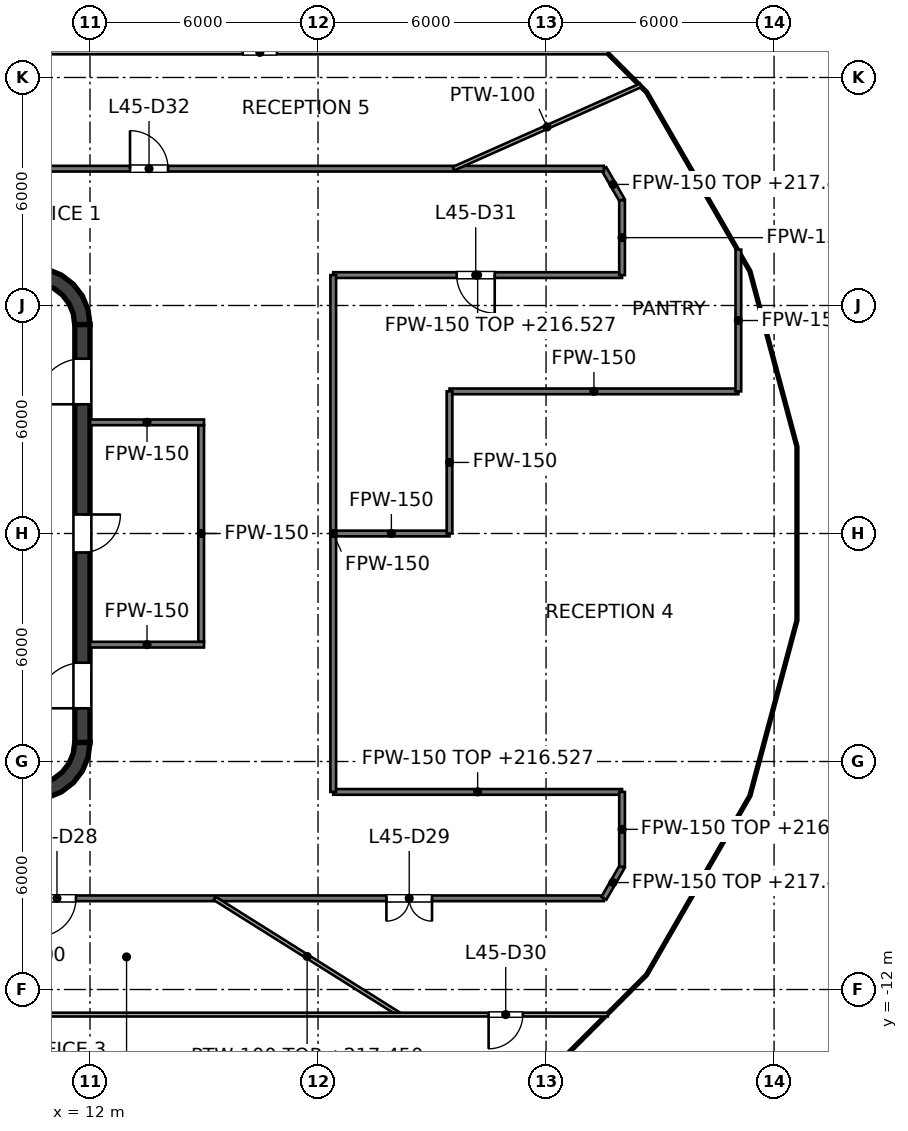
"""IFC4 building model, lengths in metres.
Left out: names, types, materials, properties, quantities, classifications, styles, units other than length and angle.
Written with IfcOpenShell. Run it as: python <this file> out.ifc"""

import sys

from ifc_helpers import new_model, si_unit, direction, frame, frame_2d, origin, place, context, subcontext, project, spatial, polyline, rectangle, outline, extrude, element, fill, save


model = new_model("IFC4")
c1 = context("Model", 3, precision=1e-05, world=origin(), true_north=direction((0.0, 1.0)))
c2 = subcontext(c1, "Body", "Model", "MODEL_VIEW")
j1 = project(units=[si_unit("LENGTHUNIT", "METRE"), si_unit("PLANEANGLEUNIT", "RADIAN")], contexts=[c1])
p1 = place(None, origin())
s1 = spatial("IfcSite", under=j1, at=p1, CompositionType="ELEMENT")
p2 = place(p1, origin())
s2 = spatial("IfcBuilding", under=s1, at=p2, CompositionType="ELEMENT")
p3 = place(p2, frame((0.0, 0.0, 213.6)))
s3 = spatial("IfcBuildingStorey", under=s2, at=p3, CompositionType="ELEMENT", Elevation=213.6)
p4 = place(p3, frame((11.8, -5.5, 0.0), z_axis=(0.0, 0.0, 1.0), x_axis=(0.0, 1.0, 0.0)))
e1 = element("IfcWall", 1, at=p4, inside=s3, PredefinedType="SHEAR", context=c2, shape_type="SweptSolid", body=[
    extrude(rectangle(XDim=11.0, YDim=0.4, at=frame_2d((5.5, 0.0))), origin(), (0.0, 0.0, 1.0), 4.0),
])
p5 = place(p4, frame((5.0, 0.0, 0.0)))
e2 = element("IfcOpeningElement", 2, at=p5, cuts=e1, PredefinedType="OPENING", context=c2, shape_type="SweptSolid", body=[
    extrude(rectangle(XDim=1.0, YDim=2.1, at=frame_2d((0.5, 1.05))), frame((0.0, 0.2, 0.0), z_axis=(0.0, -1.0, 0.0), x_axis=(1.0, 0.0, 0.0)), (0.0, 0.0, 1.0), 0.4),
])
p6 = place(p4, frame((0.9, 0.0, 0.0)))
e3 = element("IfcOpeningElement", 3, at=p6, cuts=e1, PredefinedType="OPENING", context=c2, shape_type="SweptSolid", body=[
    extrude(rectangle(XDim=1.2, YDim=2.1, at=frame_2d((0.6, 1.05))), frame((0.0, 0.2, 0.0), z_axis=(0.0, -1.0, 0.0), x_axis=(1.0, 0.0, 0.0)), (0.0, 0.0, 1.0), 0.4),
])
p7 = place(p4, frame((8.9, 0.0, 0.0)))
e4 = element("IfcOpeningElement", 4, at=p7, cuts=e1, PredefinedType="OPENING", context=c2, shape_type="SweptSolid", body=[
    extrude(rectangle(XDim=1.2, YDim=2.1, at=frame_2d((0.6, 1.05))), frame((0.0, 0.2, 0.0), z_axis=(0.0, -1.0, 0.0), x_axis=(1.0, 0.0, 0.0)), (0.0, 0.0, 1.0), 0.4),
])
p8 = place(p3, origin())
e5 = element("IfcWall", 5, at=p8, inside=s3, PredefinedType="SHEAR", context=c2, shape_type="SweptSolid", body=[
    extrude(outline(polyline([(10.5, 7.0), (10.5, 6.596), (10.784, 6.559), (11.048, 6.45), (11.275, 6.275), (11.45, 6.048), (11.559, 5.784), (11.596, 5.5), (12.0, 5.5), (11.949, 5.888), (11.799, 6.25), (11.561, 6.561), (11.25, 6.799), (10.888, 6.949), (10.5, 7.0)])), origin(), (0.0, 0.0, 1.0), 4.0),
])
e6 = element("IfcWall", 6, at=p8, inside=s3, PredefinedType="SHEAR", context=c2, shape_type="SweptSolid", body=[
    extrude(outline(polyline([(12.0, -5.5), (11.596, -5.5), (11.559, -5.784), (11.45, -6.048), (11.275, -6.275), (11.048, -6.45), (10.784, -6.559), (10.5, -6.596), (10.5, -7.0), (10.888, -6.949), (11.25, -6.799), (11.561, -6.561), (11.799, -6.25), (11.949, -5.888), (12.0, -5.5)])), origin(), (0.0, 0.0, 1.0), 4.0),
])
p9 = place(p3, frame((14.925, -2.85, 0.0), z_axis=(0.0, 0.0, 1.0), x_axis=(0.0, 1.0, 0.0)))
e7 = element("IfcWall", 7, at=p9, inside=s3, PredefinedType="PARTITIONING", context=c2, shape_type="SweptSolid", body=[
    extrude(rectangle(XDim=5.7, YDim=0.15, at=frame_2d((2.85, 0.0))), origin(), (0.0, 0.0, 1.0), 2.918),
])
for number, where, z_axis, x_axis in (
    (8, (12.0, 2.925, 0.0), (0.0, 0.0, 1.0), (1.0, 0.0, 0.0)),
    (9, (12.0, -2.925, 0.0), (0.0, 0.0, 1.0), (1.0, 0.0, 0.0)),
):
    element("IfcWall", number, at=place(p3, frame(where, z_axis=z_axis, x_axis=x_axis)), inside=s3, PredefinedType="PARTITIONING", context=c2, shape_type="SweptSolid", body=[
        extrude(rectangle(XDim=3.0, YDim=0.15, at=frame_2d((1.5, 0.0))), origin(), (0.0, 0.0, 1.0), 2.918),
    ])
p10 = place(p3, frame((25.522, 9.6, 0.0), z_axis=(0.0, 0.0, 1.0), x_axis=(0.499980071345, -0.866036909293, 0.0)))
e10 = element("IfcWall", 10, at=p10, inside=s3, PredefinedType="PARTITIONING", context=c2, shape_type="SweptSolid", body=[
    extrude(rectangle(XDim=0.957, YDim=0.15, at=frame_2d((0.479, 0.0))), origin(), (0.0, 0.0, 1.0), 3.85),
])
p11 = place(p3, frame((-25.521, -9.6, 0.0), z_axis=(0.0, 0.0, 1.0), x_axis=(1.0, 0.0, 0.0)))
e11 = element("IfcWall", 11, at=p11, inside=s3, PredefinedType="PARTITIONING", context=c2, shape_type="SweptSolid", body=[
    extrude(rectangle(XDim=51.042, YDim=0.15, at=frame_2d((25.521, 0.0))), origin(), (0.0, 0.0, 1.0), 2.927),
])
p12 = place(p11, frame((5.073, 0.0, 0.0)))
e12 = element("IfcOpeningElement", 12, at=p12, cuts=e11, PredefinedType="OPENING", context=c2, shape_type="SweptSolid", body=[
    extrude(rectangle(XDim=1.0, YDim=2.1, at=frame_2d((0.5, 1.05))), frame((0.0, 0.075, 0.0), z_axis=(0.0, -1.0, 0.0), x_axis=(1.0, 0.0, 0.0)), (0.0, 0.0, 1.0), 0.15),
])
p13 = place(p11, frame((13.936, 0.0, 0.0)))
e13 = element("IfcOpeningElement", 13, at=p13, cuts=e11, PredefinedType="OPENING", context=c2, shape_type="SweptSolid", body=[
    extrude(rectangle(XDim=1.0, YDim=2.1, at=frame_2d((0.5, 1.05))), frame((0.0, 0.075, 0.0), z_axis=(0.0, -1.0, 0.0), x_axis=(1.0, 0.0, 0.0)), (0.0, 0.0, 1.0), 0.15),
])
p14 = place(p11, frame((23.485, 0.0, 0.0)))
e14 = element("IfcOpeningElement", 14, at=p14, cuts=e11, PredefinedType="OPENING", context=c2, shape_type="SweptSolid", body=[
    extrude(rectangle(XDim=1.0, YDim=2.1, at=frame_2d((0.5, 1.05))), frame((0.0, 0.075, 0.0), z_axis=(0.0, -1.0, 0.0), x_axis=(1.0, 0.0, 0.0)), (0.0, 0.0, 1.0), 0.15),
])
p15 = place(p11, frame((29.799, 0.0, 0.0)))
e15 = element("IfcOpeningElement", 15, at=p15, cuts=e11, PredefinedType="OPENING", context=c2, shape_type="SweptSolid", body=[
    extrude(rectangle(XDim=1.0, YDim=2.1, at=frame_2d((0.5, 1.05))), frame((0.0, 0.075, 0.0), z_axis=(0.0, -1.0, 0.0), x_axis=(1.0, 0.0, 0.0)), (0.0, 0.0, 1.0), 0.15),
])
p16 = place(p11, frame((36.152, 0.0, 0.0)))
e16 = element("IfcOpeningElement", 16, at=p16, cuts=e11, PredefinedType="OPENING", context=c2, shape_type="SweptSolid", body=[
    extrude(rectangle(XDim=1.0, YDim=2.1, at=frame_2d((0.5, 1.05))), frame((0.0, 0.075, 0.0), z_axis=(0.0, -1.0, 0.0), x_axis=(1.0, 0.0, 0.0)), (0.0, 0.0, 1.0), 0.15),
])
p17 = place(p11, frame((45.321, 0.0, 0.0)))
e17 = element("IfcOpeningElement", 17, at=p17, cuts=e11, PredefinedType="OPENING", context=c2, shape_type="SweptSolid", body=[
    extrude(rectangle(XDim=1.2, YDim=2.1, at=frame_2d((0.6, 1.05))), frame((0.0, 0.075, 0.0), z_axis=(0.0, -1.0, 0.0), x_axis=(1.0, 0.0, 0.0)), (0.0, 0.0, 1.0), 0.15),
])
p18 = place(p3, frame((18.4, -6.8, 0.0), z_axis=(0.0, 0.0, 1.0), x_axis=(1.0, 0.0, 0.0)))
e18 = element("IfcWall", 18, at=p18, inside=s3, PredefinedType="PARTITIONING", context=c2, shape_type="SweptSolid", body=[
    extrude(rectangle(XDim=7.6, YDim=0.15, at=frame_2d((3.8, 0.0))), origin(), (0.0, 0.0, 1.0), 2.927),
])
p19 = place(p3, frame((18.4, 0.0, 0.0), z_axis=(0.0, 0.0, 1.0), x_axis=(1.0, 0.0, 0.0)))
e19 = element("IfcWall", 19, at=p19, inside=s3, PredefinedType="PARTITIONING", context=c2, shape_type="SweptSolid", body=[
    extrude(rectangle(XDim=3.06, YDim=0.15, at=frame_2d((1.53, 0.0))), origin(), (0.0, 0.0, 1.0), 2.918),
])
p20 = place(p3, frame((21.46, 3.74, 0.0), z_axis=(0.0, 0.0, 1.0), x_axis=(1.0, 0.0, 0.0)))
e20 = element("IfcWall", 20, at=p20, inside=s3, PredefinedType="PARTITIONING", context=c2, shape_type="SweptSolid", body=[
    extrude(rectangle(XDim=7.6, YDim=0.15, at=frame_2d((3.8, 0.0))), origin(), (0.0, 0.0, 1.0), 2.918),
])
p21 = place(p3, frame((18.4, 6.8, 0.0), z_axis=(0.0, 0.0, 1.0), x_axis=(1.0, 0.0, 0.0)))
e21 = element("IfcWall", 21, at=p21, inside=s3, PredefinedType="PARTITIONING", context=c2, shape_type="SweptSolid", body=[
    extrude(rectangle(XDim=7.6, YDim=0.15, at=frame_2d((3.8, 0.0))), origin(), (0.0, 0.0, 1.0), 2.927),
])
p22 = place(p21, frame((3.249, 0.0, 0.0)))
e22 = element("IfcOpeningElement", 22, at=p22, cuts=e21, PredefinedType="OPENING", context=c2, shape_type="SweptSolid", body=[
    extrude(rectangle(XDim=1.0, YDim=2.1, at=frame_2d((0.5, 1.05))), frame((0.0, 0.075, 0.0), z_axis=(0.0, -1.0, 0.0), x_axis=(1.0, 0.0, 0.0)), (0.0, 0.0, 1.0), 0.15),
])
p23 = place(p3, frame((-25.522, 9.6, 0.0), z_axis=(0.0, 0.0, 1.0), x_axis=(1.0, 0.0, 0.0)))
e23 = element("IfcWall", 23, at=p23, inside=s3, PredefinedType="PARTITIONING", context=c2, shape_type="SweptSolid", body=[
    extrude(rectangle(XDim=51.044, YDim=0.15, at=frame_2d((25.522, 0.0))), origin(), (0.0, 0.0, 1.0), 2.927),
])
p24 = place(p23, frame((28.517, 0.0, 0.0)))
e24 = element("IfcOpeningElement", 24, at=p24, cuts=e23, PredefinedType="OPENING", context=c2, shape_type="SweptSolid", body=[
    extrude(rectangle(XDim=1.0, YDim=2.1, at=frame_2d((0.5, 1.05))), frame((0.0, 0.075, 0.0), z_axis=(0.0, -1.0, 0.0), x_axis=(1.0, 0.0, 0.0)), (0.0, 0.0, 1.0), 0.15),
])
p25 = place(p23, frame((24.65, 0.0, 0.0)))
e25 = element("IfcOpeningElement", 25, at=p25, cuts=e23, PredefinedType="OPENING", context=c2, shape_type="SweptSolid", body=[
    extrude(rectangle(XDim=1.0, YDim=2.1, at=frame_2d((0.5, 1.05))), frame((0.0, 0.075, 0.0), z_axis=(0.0, -1.0, 0.0), x_axis=(1.0, 0.0, 0.0)), (0.0, 0.0, 1.0), 0.15),
])
p26 = place(p23, frame((19.126, 0.0, 0.0)))
e26 = element("IfcOpeningElement", 26, at=p26, cuts=e23, PredefinedType="OPENING", context=c2, shape_type="SweptSolid", body=[
    extrude(rectangle(XDim=1.0, YDim=2.1, at=frame_2d((0.5, 1.05))), frame((0.0, 0.075, 0.0), z_axis=(0.0, -1.0, 0.0), x_axis=(1.0, 0.0, 0.0)), (0.0, 0.0, 1.0), 0.15),
])
p27 = place(p23, frame((13.909, 0.0, 0.0)))
e27 = element("IfcOpeningElement", 27, at=p27, cuts=e23, PredefinedType="OPENING", context=c2, shape_type="SweptSolid", body=[
    extrude(rectangle(XDim=1.0, YDim=2.1, at=frame_2d((0.5, 1.05))), frame((0.0, 0.075, 0.0), z_axis=(0.0, -1.0, 0.0), x_axis=(1.0, 0.0, 0.0)), (0.0, 0.0, 1.0), 0.15),
])
p28 = place(p23, frame((5.848, 0.0, 0.0)))
e28 = element("IfcOpeningElement", 28, at=p28, cuts=e23, PredefinedType="OPENING", context=c2, shape_type="SweptSolid", body=[
    extrude(rectangle(XDim=1.2, YDim=2.1, at=frame_2d((0.6, 1.05))), frame((0.0, 0.075, 0.0), z_axis=(0.0, -1.0, 0.0), x_axis=(1.0, 0.0, 0.0)), (0.0, 0.0, 1.0), 0.15),
])
p29 = place(p23, frame((38.575, 0.0, 0.0)))
e29 = element("IfcOpeningElement", 29, at=p29, cuts=e23, PredefinedType="OPENING", context=c2, shape_type="SweptSolid", body=[
    extrude(rectangle(XDim=1.0, YDim=2.1, at=frame_2d((0.5, 1.05))), frame((0.0, 0.075, 0.0), z_axis=(0.0, -1.0, 0.0), x_axis=(1.0, 0.0, 0.0)), (0.0, 0.0, 1.0), 0.15),
])
p30 = place(p3, frame((25.521, -9.6, 0.0), z_axis=(0.0, 0.0, 1.0), x_axis=(0.499950501706, 0.866053979752, 0.0)))
e30 = element("IfcWall", 30, at=p30, inside=s3, PredefinedType="PARTITIONING", context=c2, shape_type="SweptSolid", body=[
    extrude(rectangle(XDim=0.958, YDim=0.15, at=frame_2d((0.479, 0.0))), origin(), (0.0, 0.0, 1.0), 3.85),
])
p31 = place(p3, frame((5.543, 9.6, 0.0), z_axis=(0.0, 0.0, 1.0), x_axis=(0.499967881601, 0.866043946556, 0.0)))
e31 = element("IfcWall", 31, at=p31, inside=s3, PredefinedType="PARTITIONING", context=c2, shape_type="SweptSolid", body=[
    extrude(rectangle(XDim=13.318, YDim=0.15, at=frame_2d((6.659, 0.0))), origin(), (0.0, 0.0, 1.0), 3.302),
])
p32 = place(p3, frame((29.06, 3.74, 0.0), z_axis=(0.0, 0.0, 1.0), x_axis=(0.0, 1.0, 0.0)))
e32 = element("IfcWall", 32, at=p32, inside=s3, PredefinedType="PARTITIONING", context=c2, shape_type="SweptSolid", body=[
    extrude(rectangle(XDim=3.73, YDim=0.15, at=frame_2d((1.865, 0.0))), origin(), (0.0, 0.0, 1.0), 2.918),
])
for number, where, z_axis, x_axis in (
    (33, (26.0, -8.771, 0.0), (0.0, 0.0, 1.0), (0.0, 1.0, 0.0)),
    (34, (26.0, 6.8, 0.0), (0.0, 0.0, 1.0), (0.0, 1.0, 0.0)),
):
    element("IfcWall", number, at=place(p3, frame(where, z_axis=z_axis, x_axis=x_axis)), inside=s3, PredefinedType="PARTITIONING", context=c2, shape_type="SweptSolid", body=[
        extrude(rectangle(XDim=1.971, YDim=0.15, at=frame_2d((0.985, 0.0))), origin(), (0.0, 0.0, 1.0), 2.927),
    ])
p33 = place(p3, frame((21.46, 0.0, 0.0), z_axis=(0.0, 0.0, 1.0), x_axis=(0.0, 1.0, 0.0)))
e35 = element("IfcWall", 35, at=p33, inside=s3, PredefinedType="PARTITIONING", context=c2, shape_type="SweptSolid", body=[
    extrude(rectangle(XDim=3.74, YDim=0.15, at=frame_2d((1.87, 0.0))), origin(), (0.0, 0.0, 1.0), 2.918),
])
p34 = place(p3, frame((18.4, -6.8, 0.0), z_axis=(0.0, 0.0, 1.0), x_axis=(0.0, 1.0, 0.0)))
e36 = element("IfcWall", 36, at=p34, inside=s3, PredefinedType="PARTITIONING", context=c2, shape_type="SweptSolid", body=[
    extrude(rectangle(XDim=13.6, YDim=0.15, at=frame_2d((6.8, 0.0))), origin(), (0.0, 0.0, 1.0), 2.918),
])
p35 = place(p3, frame((15.278, -9.6, 0.0), z_axis=(0.0, 0.0, 1.0), x_axis=(0.84673434941, -0.532015922252, 0.0)))
e37 = element("IfcWall", 37, at=p35, inside=s3, PredefinedType="PARTITIONING", context=c2, shape_type="SweptSolid", body=[
    extrude(rectangle(XDim=5.751, YDim=0.1, at=frame_2d((2.876, 0.0))), origin(), (0.0, 0.0, 1.0), 3.85),
])
p36 = place(p3, frame((-21.928, -12.66, 0.0), z_axis=(0.0, 0.0, 1.0), x_axis=(1.0, 0.0, 0.0)))
e38 = element("IfcWall", 38, at=p36, inside=s3, PredefinedType="PARTITIONING", context=c2, shape_type="SweptSolid", body=[
    extrude(rectangle(XDim=47.555, YDim=0.1, at=frame_2d((23.777, 0.0))), origin(), (0.0, 0.0, 1.0), 2.927),
])
p37 = place(p36, frame((19.02, 0.0, 0.0)))
e39 = element("IfcOpeningElement", 39, at=p37, cuts=e38, PredefinedType="OPENING", context=c2, shape_type="SweptSolid", body=[
    extrude(rectangle(XDim=1.8, YDim=2.1, at=frame_2d((0.9, 1.05))), frame((0.0, 0.05, 0.0), z_axis=(0.0, -1.0, 0.0), x_axis=(1.0, 0.0, 0.0)), (0.0, 0.0, 1.0), 0.1),
])
p38 = place(p36, frame((44.417, 0.0, 0.0)))
e40 = element("IfcOpeningElement", 40, at=p38, cuts=e38, PredefinedType="OPENING", context=c2, shape_type="SweptSolid", body=[
    extrude(rectangle(XDim=0.9, YDim=2.1, at=frame_2d((0.45, 1.05))), frame((0.0, 0.05, 0.0), z_axis=(0.0, -1.0, 0.0), x_axis=(1.0, 0.0, 0.0)), (0.0, 0.0, 1.0), 0.1),
])
p39 = place(p3, frame((-16.649, 12.66, 0.0), z_axis=(0.0, 0.0, 1.0), x_axis=(1.0, 0.0, 0.0)))
e41 = element("IfcWall", 41, at=p39, inside=s3, PredefinedType="PARTITIONING", context=c2, shape_type="SweptSolid", body=[
    extrude(rectangle(XDim=42.276, YDim=0.1, at=frame_2d((21.138, 0.0))), origin(), (0.0, 0.0, 1.0), 2.927),
])
p40 = place(p39, frame((8.025, 0.0, 0.0)))
e42 = element("IfcOpeningElement", 42, at=p40, cuts=e41, PredefinedType="OPENING", context=c2, shape_type="SweptSolid", body=[
    extrude(rectangle(XDim=1.8, YDim=2.1, at=frame_2d((0.9, 1.05))), frame((0.0, 0.05, 0.0), z_axis=(0.0, -1.0, 0.0), x_axis=(1.0, 0.0, 0.0)), (0.0, 0.0, 1.0), 0.1),
])
p41 = place(p39, frame((32.667, 0.0, 0.0)))
e43 = element("IfcOpeningElement", 43, at=p41, cuts=e41, PredefinedType="OPENING", context=c2, shape_type="SweptSolid", body=[
    extrude(rectangle(XDim=0.9, YDim=2.1, at=frame_2d((0.45, 1.05))), frame((0.0, 0.05, 0.0), z_axis=(0.0, -1.0, 0.0), x_axis=(1.0, 0.0, 0.0)), (0.0, 0.0, 1.0), 0.1),
])
p42 = place(p3, frame((21.563, 9.6, 0.0), z_axis=(0.0, 0.0, 1.0), x_axis=(0.91352396797, 0.406784906239, 0.0)))
e44 = element("IfcWall", 44, at=p42, inside=s3, PredefinedType="PARTITIONING", context=c2, shape_type="SweptSolid", body=[
    extrude(rectangle(XDim=5.396, YDim=0.1, at=frame_2d((2.698, 0.0))), origin(), (0.0, 0.0, 1.0), 2.927),
])
p43 = place(p5, origin())
e45 = element("IfcDoor", 45, at=p43, inside=s3, OperationType="SINGLE_SWING_RIGHT", PredefinedType="DOOR", context=c2, shape_type="SweptSolid", body=[
    extrude(rectangle(XDim=1.0, YDim=2.1, at=frame_2d((0.5, 1.05))), frame((0.0, 0.025, 0.0), z_axis=(0.0, -1.0, 0.0), x_axis=(1.0, 0.0, 0.0)), (0.0, 0.0, 1.0), 0.05),
])
fill(e2, e45)
p44 = place(p6, origin())
e46 = element("IfcDoor", 46, at=p44, inside=s3, OperationType="SINGLE_SWING_LEFT", PredefinedType="DOOR", context=c2, shape_type="SweptSolid", body=[
    extrude(rectangle(XDim=1.2, YDim=2.1, at=frame_2d((0.6, 1.05))), frame((0.0, 0.025, 0.0), z_axis=(0.0, -1.0, 0.0), x_axis=(1.0, 0.0, 0.0)), (0.0, 0.0, 1.0), 0.05),
])
fill(e3, e46)
p45 = place(p7, origin())
e47 = element("IfcDoor", 47, at=p45, inside=s3, OperationType="SINGLE_SWING_LEFT", PredefinedType="DOOR", context=c2, shape_type="SweptSolid", body=[
    extrude(rectangle(XDim=1.2, YDim=2.1, at=frame_2d((0.6, 1.05))), frame((0.0, 0.025, 0.0), z_axis=(0.0, -1.0, 0.0), x_axis=(1.0, 0.0, 0.0)), (0.0, 0.0, 1.0), 0.05),
])
fill(e4, e47)
p46 = place(p16, origin())
e48 = element("IfcDoor", 48, at=p46, inside=s3, OperationType="SINGLE_SWING_LEFT", PredefinedType="DOOR", context=c2, shape_type="SweptSolid", body=[
    extrude(rectangle(XDim=1.0, YDim=2.1, at=frame_2d((0.5, 1.05))), frame((0.0, 0.025, 0.0), z_axis=(0.0, -1.0, 0.0), x_axis=(1.0, 0.0, 0.0)), (0.0, 0.0, 1.0), 0.05),
])
fill(e16, e48)
p47 = place(p17, origin())
e49 = element("IfcDoor", 49, at=p47, inside=s3, OperationType="DOUBLE_DOOR_SINGLE_SWING", PredefinedType="DOOR", context=c2, shape_type="SweptSolid", body=[
    extrude(rectangle(XDim=1.2, YDim=2.1, at=frame_2d((0.6, 1.05))), frame((0.0, 0.025, 0.0), z_axis=(0.0, -1.0, 0.0), x_axis=(1.0, 0.0, 0.0)), (0.0, 0.0, 1.0), 0.05),
])
fill(e17, e49)
p48 = place(p38, origin())
e50 = element("IfcDoor", 50, at=p48, inside=s3, OperationType="SINGLE_SWING_LEFT", PredefinedType="DOOR", context=c2, shape_type="SweptSolid", body=[
    extrude(rectangle(XDim=0.9, YDim=2.1, at=frame_2d((0.45, 1.05))), frame((0.0, 0.025, 0.0), z_axis=(0.0, -1.0, 0.0), x_axis=(1.0, 0.0, 0.0)), (0.0, 0.0, 1.0), 0.05),
])
fill(e40, e50)
p49 = place(p22, origin())
e51 = element("IfcDoor", 51, at=p49, inside=s3, OperationType="SINGLE_SWING_RIGHT", PredefinedType="DOOR", context=c2, shape_type="SweptSolid", body=[
    extrude(rectangle(XDim=1.0, YDim=2.1, at=frame_2d((0.5, 1.05))), frame((0.0, 0.025, 0.0), z_axis=(0.0, -1.0, 0.0), x_axis=(1.0, 0.0, 0.0)), (0.0, 0.0, 1.0), 0.05),
])
fill(e22, e51)
p50 = place(p29, origin())
e52 = element("IfcDoor", 52, at=p50, inside=s3, OperationType="SINGLE_SWING_LEFT", PredefinedType="DOOR", context=c2, shape_type="SweptSolid", body=[
    extrude(rectangle(XDim=1.0, YDim=2.1, at=frame_2d((0.5, 1.05))), frame((0.0, 0.025, 0.0), z_axis=(0.0, -1.0, 0.0), x_axis=(1.0, 0.0, 0.0)), (0.0, 0.0, 1.0), 0.05),
])
fill(e29, e52)
p51 = place(p41, origin())
e53 = element("IfcDoor", 53, at=p51, inside=s3, OperationType="SINGLE_SWING_LEFT", PredefinedType="DOOR", context=c2, shape_type="SweptSolid", body=[
    extrude(rectangle(XDim=0.9, YDim=2.1, at=frame_2d((0.45, 1.05))), frame((0.0, 0.025, 0.0), z_axis=(0.0, -1.0, 0.0), x_axis=(1.0, 0.0, 0.0)), (0.0, 0.0, 1.0), 0.05),
])
fill(e43, e53)
save(model, sys.argv[1])
